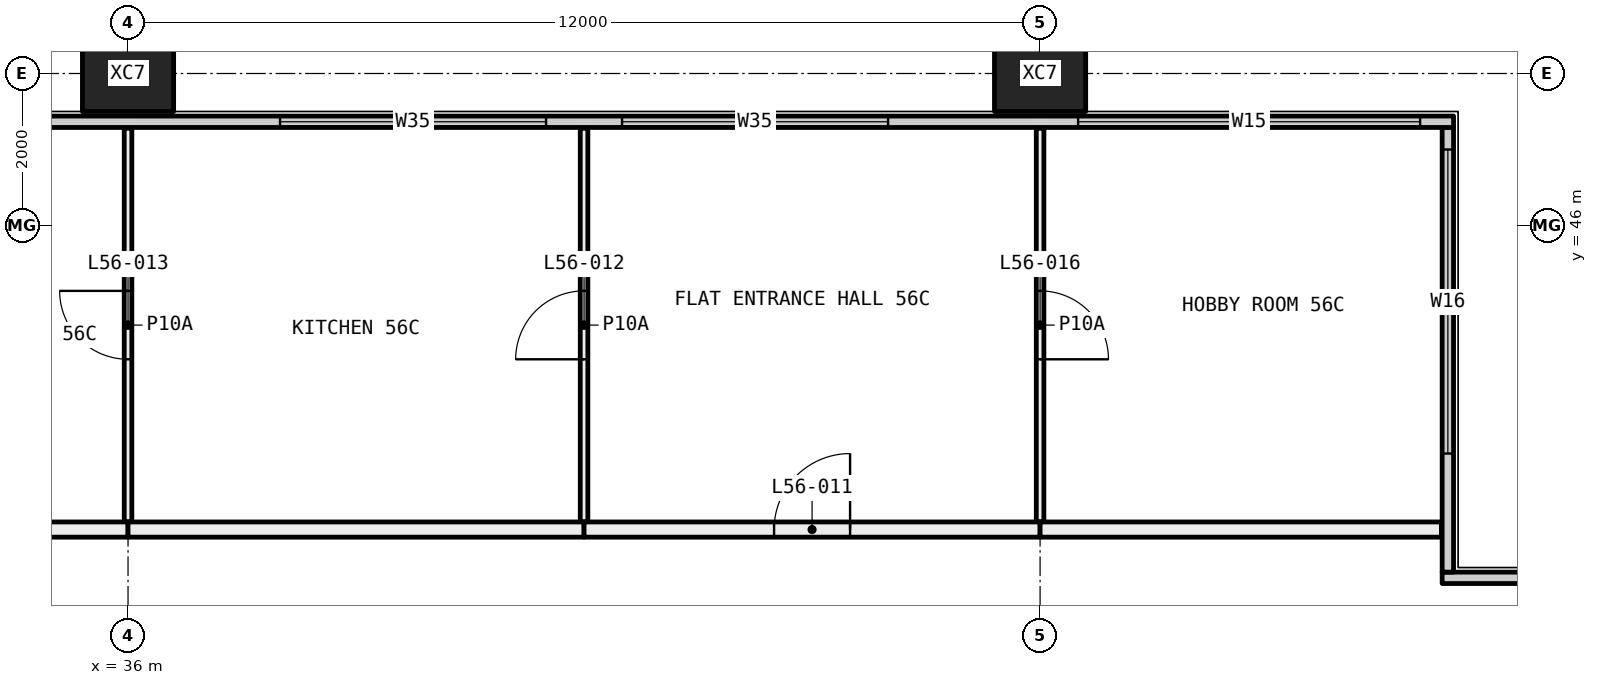
"""IFC4 building model, lengths in metres.
Left out: names, types, materials, properties, quantities, classifications, styles, units other than length and angle.
Written with IfcOpenShell. Run it as: python <this file> out.ifc"""

import sys

from ifc_helpers import new_model, si_unit, direction, frame, frame_2d, origin, origin_2d, place, context, subcontext, project, spatial, rectangle, hollow_rectangle, extrude, element, fill, save


model = new_model("IFC4")
c1 = context("Model", 3, precision=1e-05, world=origin(), true_north=direction((0.0, 1.0)))
c2 = subcontext(c1, "Body", "Model", "MODEL_VIEW")
j1 = project(units=[si_unit("LENGTHUNIT", "METRE"), si_unit("PLANEANGLEUNIT", "RADIAN")], contexts=[c1])
p1 = place(None, origin())
s1 = spatial("IfcSite", under=j1, at=p1, CompositionType="ELEMENT")
p2 = place(p1, origin())
s2 = spatial("IfcBuilding", under=s1, at=p2, CompositionType="ELEMENT")
p3 = place(p2, frame((0.0, 0.0, 210.0)))
s3 = spatial("IfcBuildingStorey", under=s2, at=p3, CompositionType="ELEMENT", Elevation=210.0)
for number, where, z_axis, x_axis in (
    (1, (36.0, 48.0, -0.4), (0.0, 0.0, 1.0), (1.0, 0.0, 0.0)),
    (2, (48.0, 48.0, -0.4), (0.0, 0.0, 1.0), (1.0, 0.0, 0.0)),
):
    element("IfcColumn", number, at=place(p3, frame(where, z_axis=z_axis, x_axis=x_axis)), inside=s3, PredefinedType="COLUMN", context=c2, shape_type="SweptSolid", body=[
        extrude(hollow_rectangle(XDim=1.2, YDim=1.0, WallThickness=0.045, at=origin_2d()), origin(), (0.0, 0.0, 1.0), 3.45),
    ])
p4 = place(p3, frame((53.29, 41.365, 0.0), z_axis=(0.0, 0.0, 1.0), x_axis=(1.0, 0.0, 0.0)))
e3 = element("IfcWall", 3, at=p4, inside=s3, PredefinedType="ELEMENTEDWALL", context=c2, shape_type="SweptSolid", body=[
    extrude(rectangle(XDim=6.15, YDim=0.15, at=frame_2d((3.075, 0.0))), origin(), (0.0, 0.0, 1.0), 3.05),
])
p5 = place(p4, frame((1.71, 0.0, 0.45)))
e4 = element("IfcOpeningElement", 4, at=p5, cuts=e3, PredefinedType="OPENING", context=c2, shape_type="SweptSolid", body=[
    extrude(rectangle(XDim=4.0, YDim=2.55, at=frame_2d((2.0, 1.275))), frame((0.0, 0.085, 0.0), z_axis=(0.0, -1.0, 0.0), x_axis=(1.0, 0.0, 0.0)), (0.0, 0.0, 1.0), 0.17),
])
p6 = place(p3, frame((53.365, 41.44, 0.0), z_axis=(0.0, 0.0, 1.0), x_axis=(0.0, 1.0, 0.0)))
e5 = element("IfcWall", 5, at=p6, inside=s3, PredefinedType="ELEMENTEDWALL", context=c2, shape_type="SweptSolid", body=[
    extrude(rectangle(XDim=5.85, YDim=0.15, at=frame_2d((2.925, 0.0))), origin(), (0.0, 0.0, 1.0), 3.05),
])
p7 = place(p6, frame((1.56, 0.0, 0.45)))
e6 = element("IfcOpeningElement", 6, at=p7, cuts=e5, PredefinedType="OPENING", context=c2, shape_type="SweptSolid", body=[
    extrude(rectangle(XDim=4.0, YDim=2.55, at=frame_2d((2.0, 1.275))), frame((0.0, 0.085, 0.0), z_axis=(0.0, -1.0, 0.0), x_axis=(1.0, 0.0, 0.0)), (0.0, 0.0, 1.0), 0.17),
])
p8 = place(p3, frame((6.56, 47.365, 0.0), z_axis=(0.0, 0.0, 1.0), x_axis=(1.0, 0.0, 0.0)))
e7 = element("IfcWall", 7, at=p8, inside=s3, PredefinedType="ELEMENTEDWALL", context=c2, shape_type="SweptSolid", body=[
    extrude(rectangle(XDim=46.88, YDim=0.15, at=frame_2d((23.44, 0.0))), origin(), (0.0, 0.0, 1.0), 3.05),
])
p9 = place(p8, frame((0.44, 0.0, 0.45)))
e8 = element("IfcOpeningElement", 8, at=p9, cuts=e7, PredefinedType="OPENING", context=c2, shape_type="SweptSolid", body=[
    extrude(rectangle(XDim=4.5, YDim=2.55, at=frame_2d((2.25, 1.275))), frame((0.0, 0.085, 0.0), z_axis=(0.0, -1.0, 0.0), x_axis=(1.0, 0.0, 0.0)), (0.0, 0.0, 1.0), 0.17),
])
p10 = place(p8, frame((7.44, 0.0, 0.45)))
e9 = element("IfcOpeningElement", 9, at=p10, cuts=e7, PredefinedType="OPENING", context=c2, shape_type="SweptSolid", body=[
    extrude(rectangle(XDim=3.5, YDim=2.55, at=frame_2d((1.75, 1.275))), frame((0.0, 0.085, 0.0), z_axis=(0.0, -1.0, 0.0), x_axis=(1.0, 0.0, 0.0)), (0.0, 0.0, 1.0), 0.17),
])
p11 = place(p8, frame((11.94, 0.0, 0.45)))
e10 = element("IfcOpeningElement", 10, at=p11, cuts=e7, PredefinedType="OPENING", context=c2, shape_type="SweptSolid", body=[
    extrude(rectangle(XDim=3.5, YDim=2.55, at=frame_2d((1.75, 1.275))), frame((0.0, 0.085, 0.0), z_axis=(0.0, -1.0, 0.0), x_axis=(1.0, 0.0, 0.0)), (0.0, 0.0, 1.0), 0.17),
])
p12 = place(p8, frame((19.44, 0.0, 0.45)))
e11 = element("IfcOpeningElement", 11, at=p12, cuts=e7, PredefinedType="OPENING", context=c2, shape_type="SweptSolid", body=[
    extrude(rectangle(XDim=3.5, YDim=2.55, at=frame_2d((1.75, 1.275))), frame((0.0, 0.085, 0.0), z_axis=(0.0, -1.0, 0.0), x_axis=(1.0, 0.0, 0.0)), (0.0, 0.0, 1.0), 0.17),
])
p13 = place(p8, frame((23.94, 0.0, 0.45)))
e12 = element("IfcOpeningElement", 12, at=p13, cuts=e7, PredefinedType="OPENING", context=c2, shape_type="SweptSolid", body=[
    extrude(rectangle(XDim=2.0, YDim=2.55, at=frame_2d((1.0, 1.275))), frame((0.0, 0.085, 0.0), z_axis=(0.0, -1.0, 0.0), x_axis=(1.0, 0.0, 0.0)), (0.0, 0.0, 1.0), 0.17),
])
p14 = place(p8, frame((31.44, 0.0, 0.45)))
e13 = element("IfcOpeningElement", 13, at=p14, cuts=e7, PredefinedType="OPENING", context=c2, shape_type="SweptSolid", body=[
    extrude(rectangle(XDim=3.5, YDim=2.55, at=frame_2d((1.75, 1.275))), frame((0.0, 0.085, 0.0), z_axis=(0.0, -1.0, 0.0), x_axis=(1.0, 0.0, 0.0)), (0.0, 0.0, 1.0), 0.17),
])
p15 = place(p8, frame((35.94, 0.0, 0.45)))
e14 = element("IfcOpeningElement", 14, at=p15, cuts=e7, PredefinedType="OPENING", context=c2, shape_type="SweptSolid", body=[
    extrude(rectangle(XDim=3.5, YDim=2.55, at=frame_2d((1.75, 1.275))), frame((0.0, 0.085, 0.0), z_axis=(0.0, -1.0, 0.0), x_axis=(1.0, 0.0, 0.0)), (0.0, 0.0, 1.0), 0.17),
])
p16 = place(p8, frame((41.94, 0.0, 0.45)))
e15 = element("IfcOpeningElement", 15, at=p16, cuts=e7, PredefinedType="OPENING", context=c2, shape_type="SweptSolid", body=[
    extrude(rectangle(XDim=4.5, YDim=2.55, at=frame_2d((2.25, 1.275))), frame((0.0, 0.085, 0.0), z_axis=(0.0, -1.0, 0.0), x_axis=(1.0, 0.0, 0.0)), (0.0, 0.0, 1.0), 0.17),
])
p17 = place(p3, frame((36.0, 42.1, 0.0), z_axis=(0.0, 0.0, 1.0), x_axis=(0.0, 1.0, 0.0)))
e16 = element("IfcWall", 16, at=p17, inside=s3, PredefinedType="PARTITIONING", context=c2, shape_type="SweptSolid", body=[
    extrude(rectangle(XDim=5.18, YDim=0.1, at=frame_2d((2.59, 0.0))), origin(), (0.0, 0.0, 1.0), 2.45),
])
p18 = place(p17, frame((2.14, 0.0, 0.0)))
e17 = element("IfcOpeningElement", 17, at=p18, cuts=e16, PredefinedType="OPENING", context=c2, shape_type="SweptSolid", body=[
    extrude(rectangle(XDim=0.9, YDim=2.1, at=frame_2d((0.45, 1.05))), frame((0.0, 0.06, 0.0), z_axis=(0.0, -1.0, 0.0), x_axis=(1.0, 0.0, 0.0)), (0.0, 0.0, 1.0), 0.12),
])
p19 = place(p3, frame((30.0, 42.0, 0.0), z_axis=(0.0, 0.0, 1.0), x_axis=(1.0, 0.0, 0.0)))
e18 = element("IfcWall", 18, at=p19, inside=s3, PredefinedType="PARTITIONING", context=c2, shape_type="SweptSolid", body=[
    extrude(rectangle(XDim=6.0, YDim=0.2, at=frame_2d((3.0, 0.0))), origin(), (0.0, 0.0, 1.0), 2.45),
])
p20 = place(p3, frame((42.0, 42.1, 0.0), z_axis=(0.0, 0.0, 1.0), x_axis=(0.0, 1.0, 0.0)))
e19 = element("IfcWall", 19, at=p20, inside=s3, PredefinedType="PARTITIONING", context=c2, shape_type="SweptSolid", body=[
    extrude(rectangle(XDim=5.18, YDim=0.1, at=frame_2d((2.59, 0.0))), origin(), (0.0, 0.0, 1.0), 3.05),
])
p21 = place(p20, frame((2.14, 0.0, 0.0)))
e20 = element("IfcOpeningElement", 20, at=p21, cuts=e19, PredefinedType="OPENING", context=c2, shape_type="SweptSolid", body=[
    extrude(rectangle(XDim=0.9, YDim=2.1, at=frame_2d((0.45, 1.05))), frame((0.0, 0.06, 0.0), z_axis=(0.0, -1.0, 0.0), x_axis=(1.0, 0.0, 0.0)), (0.0, 0.0, 1.0), 0.12),
])
p22 = place(p3, frame((36.0, 42.0, 0.0), z_axis=(0.0, 0.0, 1.0), x_axis=(1.0, 0.0, 0.0)))
e21 = element("IfcWall", 21, at=p22, inside=s3, PredefinedType="PARTITIONING", context=c2, shape_type="SweptSolid", body=[
    extrude(rectangle(XDim=6.0, YDim=0.2, at=frame_2d((3.0, 0.0))), origin(), (0.0, 0.0, 1.0), 2.45),
])
p23 = place(p3, frame((48.0, 42.1, 0.0), z_axis=(0.0, 0.0, 1.0), x_axis=(0.0, 1.0, 0.0)))
e22 = element("IfcWall", 22, at=p23, inside=s3, PredefinedType="PARTITIONING", context=c2, shape_type="SweptSolid", body=[
    extrude(rectangle(XDim=5.18, YDim=0.1, at=frame_2d((2.59, 0.0))), origin(), (0.0, 0.0, 1.0), 3.05),
])
p24 = place(p23, frame((2.14, 0.0, 0.0)))
e23 = element("IfcOpeningElement", 23, at=p24, cuts=e22, PredefinedType="OPENING", context=c2, shape_type="SweptSolid", body=[
    extrude(rectangle(XDim=0.9, YDim=2.1, at=frame_2d((0.45, 1.05))), frame((0.0, 0.06, 0.0), z_axis=(0.0, -1.0, 0.0), x_axis=(1.0, 0.0, 0.0)), (0.0, 0.0, 1.0), 0.12),
])
p25 = place(p3, frame((42.0, 42.0, 0.0), z_axis=(0.0, 0.0, 1.0), x_axis=(1.0, 0.0, 0.0)))
e24 = element("IfcWall", 24, at=p25, inside=s3, PredefinedType="PARTITIONING", context=c2, shape_type="SweptSolid", body=[
    extrude(rectangle(XDim=6.0, YDim=0.2, at=frame_2d((3.0, 0.0))), origin(), (0.0, 0.0, 1.0), 3.05),
])
p26 = place(p25, frame((2.5, 0.0, 0.0)))
e25 = element("IfcOpeningElement", 25, at=p26, cuts=e24, PredefinedType="OPENING", context=c2, shape_type="SweptSolid", body=[
    extrude(rectangle(XDim=1.0, YDim=2.1, at=frame_2d((0.5, 1.05))), frame((0.0, 0.11, 0.0), z_axis=(0.0, -1.0, 0.0), x_axis=(1.0, 0.0, 0.0)), (0.0, 0.0, 1.0), 0.22),
])
p27 = place(p3, frame((48.0, 42.0, 0.0), z_axis=(0.0, 0.0, 1.0), x_axis=(1.0, 0.0, 0.0)))
e26 = element("IfcWall", 26, at=p27, inside=s3, PredefinedType="PARTITIONING", context=c2, shape_type="SweptSolid", body=[
    extrude(rectangle(XDim=5.28, YDim=0.2, at=frame_2d((2.64, 0.0))), origin(), (0.0, 0.0, 1.0), 3.05),
])
p28 = place(p7, origin())
e27 = element("IfcWindow", 27, at=p28, inside=s3, PartitioningType="SINGLE_PANEL", PredefinedType="WINDOW", context=c2, shape_type="SweptSolid", body=[
    extrude(rectangle(XDim=4.0, YDim=2.55, at=frame_2d((2.0, 1.275))), frame((0.0, 0.03, 0.0), z_axis=(0.0, -1.0, 0.0), x_axis=(1.0, 0.0, 0.0)), (0.0, 0.0, 1.0), 0.06),
])
fill(e6, e27)
p29 = place(p14, origin())
e28 = element("IfcWindow", 28, at=p29, inside=s3, PartitioningType="SINGLE_PANEL", PredefinedType="WINDOW", context=c2, shape_type="SweptSolid", body=[
    extrude(rectangle(XDim=3.5, YDim=2.55, at=frame_2d((1.75, 1.275))), frame((0.0, 0.03, 0.0), z_axis=(0.0, -1.0, 0.0), x_axis=(1.0, 0.0, 0.0)), (0.0, 0.0, 1.0), 0.06),
])
fill(e13, e28)
p30 = place(p15, origin())
e29 = element("IfcWindow", 29, at=p30, inside=s3, PartitioningType="SINGLE_PANEL", PredefinedType="WINDOW", context=c2, shape_type="SweptSolid", body=[
    extrude(rectangle(XDim=3.5, YDim=2.55, at=frame_2d((1.75, 1.275))), frame((0.0, 0.03, 0.0), z_axis=(0.0, -1.0, 0.0), x_axis=(1.0, 0.0, 0.0)), (0.0, 0.0, 1.0), 0.06),
])
fill(e14, e29)
p31 = place(p16, origin())
e30 = element("IfcWindow", 30, at=p31, inside=s3, PartitioningType="SINGLE_PANEL", PredefinedType="WINDOW", context=c2, shape_type="SweptSolid", body=[
    extrude(rectangle(XDim=4.5, YDim=2.55, at=frame_2d((2.25, 1.275))), frame((0.0, 0.03, 0.0), z_axis=(0.0, -1.0, 0.0), x_axis=(1.0, 0.0, 0.0)), (0.0, 0.0, 1.0), 0.06),
])
fill(e15, e30)
p32 = place(p26, origin())
e31 = element("IfcDoor", 31, at=p32, inside=s3, OperationType="SINGLE_SWING_LEFT", PredefinedType="DOOR", context=c2, shape_type="SweptSolid", body=[
    extrude(rectangle(XDim=1.0, YDim=2.1, at=frame_2d((0.5, 1.05))), frame((0.0, 0.025, 0.0), z_axis=(0.0, -1.0, 0.0), x_axis=(1.0, 0.0, 0.0)), (0.0, 0.0, 1.0), 0.05),
])
fill(e25, e31)
p33 = place(p21, origin())
e32 = element("IfcDoor", 32, at=p33, inside=s3, OperationType="SINGLE_SWING_RIGHT", PredefinedType="DOOR", context=c2, shape_type="SweptSolid", body=[
    extrude(rectangle(XDim=0.9, YDim=2.1, at=frame_2d((0.45, 1.05))), frame((0.0, 0.025, 0.0), z_axis=(0.0, -1.0, 0.0), x_axis=(1.0, 0.0, 0.0)), (0.0, 0.0, 1.0), 0.05),
])
fill(e20, e32)
p34 = place(p18, origin())
e33 = element("IfcDoor", 33, at=p34, inside=s3, OperationType="SINGLE_SWING_LEFT", PredefinedType="DOOR", context=c2, shape_type="SweptSolid", body=[
    extrude(rectangle(XDim=0.9, YDim=2.1, at=frame_2d((0.45, 1.05))), frame((0.0, 0.025, 0.0), z_axis=(0.0, -1.0, 0.0), x_axis=(1.0, 0.0, 0.0)), (0.0, 0.0, 1.0), 0.05),
])
fill(e17, e33)
p35 = place(p24, frame((0.9, 0.0, 0.0), x_axis=(-1.0, 0.0, 0.0)))
e34 = element("IfcDoor", 34, at=p35, inside=s3, OperationType="SINGLE_SWING_LEFT", PredefinedType="DOOR", context=c2, shape_type="SweptSolid", body=[
    extrude(rectangle(XDim=0.9, YDim=2.1, at=frame_2d((0.45, 1.05))), frame((0.0, 0.025, 0.0), z_axis=(0.0, -1.0, 0.0), x_axis=(1.0, 0.0, 0.0)), (0.0, 0.0, 1.0), 0.05),
])
fill(e23, e34)
save(model, sys.argv[1])
